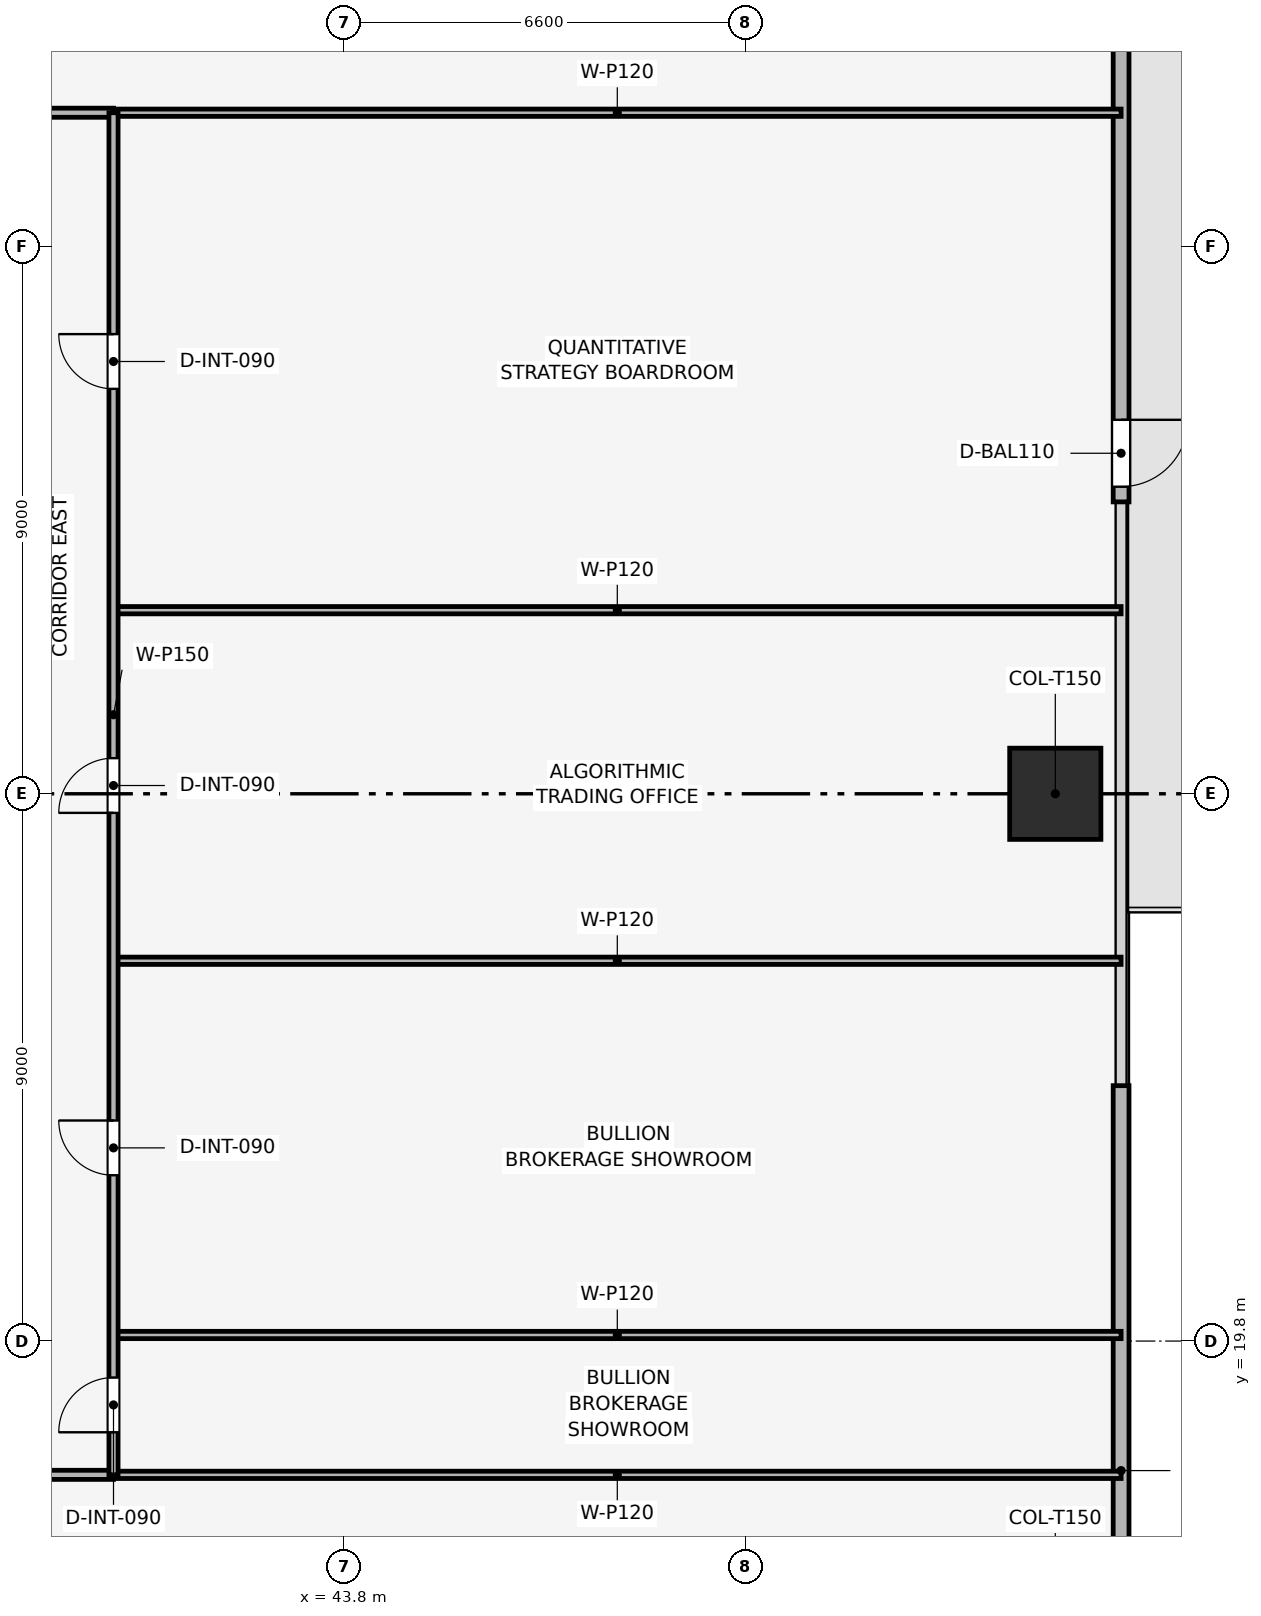
"""IFC4 building model, lengths in metres.
Left out: names, types, materials, properties, quantities, classifications, styles, units other than length and angle.
Written with IfcOpenShell. Run it as: python <this file> out.ifc"""

import sys

from ifc_helpers import new_model, si_unit, direction, frame, frame_2d, origin, origin_2d, place, context, subcontext, project, spatial, rectangle, extrude, element, fill, save


model = new_model("IFC4")
c1 = context("Model", 3, precision=1e-05, world=origin(), true_north=direction((0.0, 1.0)))
c2 = subcontext(c1, "Body", "Model", "MODEL_VIEW")
j1 = project(units=[si_unit("LENGTHUNIT", "METRE"), si_unit("PLANEANGLEUNIT", "RADIAN")], contexts=[c1])
p1 = place(None, origin())
s1 = spatial("IfcSite", under=j1, at=p1, CompositionType="ELEMENT")
p2 = place(p1, origin())
s2 = spatial("IfcBuilding", under=s1, at=p2, CompositionType="ELEMENT")
p3 = place(p2, frame((0.0, 0.0, 104.1)))
s3 = spatial("IfcBuildingStorey", under=s2, at=p3, CompositionType="ELEMENT", Elevation=104.1)
p4 = place(p3, frame((55.488, 28.8, 0.053), z_axis=(-0.224854519766, 0.0, 0.974392346512), x_axis=(0.0, -1.0, 0.0)))
e1 = element("IfcColumn", 1, at=p4, inside=s3, PredefinedType="COLUMN", context=c2, shape_type="SweptSolid", body=[
    extrude(rectangle(XDim=1.5, YDim=1.5, at=origin_2d()), origin(), (0.0, 0.0, 1.0), 3.575),
])
p5 = place(p3, frame((56.57, 48.9, 0.0), z_axis=(0.0, 0.0, 1.0), x_axis=(0.0, -1.0, 0.0)))
e2 = element("IfcWall", 2, at=p5, inside=s3, PredefinedType="SOLIDWALL", context=c2, shape_type="SweptSolid", body=[
    extrude(rectangle(XDim=15.3, YDim=0.26, at=frame_2d((7.65, 0.0))), origin(), (0.0, 0.0, 1.0), 3.54),
])
p6 = place(p5, frame((13.95, 0.0, 0.0)))
e3 = element("IfcOpeningElement", 3, at=p6, cuts=e2, PredefinedType="OPENING", context=c2, shape_type="SweptSolid", body=[
    extrude(rectangle(XDim=1.1, YDim=2.2, at=frame_2d((0.55, 1.1))), frame((0.0, 0.14, 0.0), z_axis=(0.0, -1.0, 0.0), x_axis=(1.0, 0.0, 0.0)), (0.0, 0.0, 1.0), 0.28),
])
p7 = place(p3, frame((56.57, 24.0, 0.0), z_axis=(0.0, 0.0, 1.0), x_axis=(0.0, -1.0, 0.0)))
e4 = element("IfcWall", 4, at=p7, inside=s3, PredefinedType="SOLIDWALL", context=c2, shape_type="SweptSolid", body=[
    extrude(rectangle(XDim=15.3, YDim=0.26, at=frame_2d((7.65, 0.0))), origin(), (0.0, 0.0, 1.0), 3.54),
])
p8 = place(p7, frame((12.65, 0.0, 0.72)))
e5 = element("IfcOpeningElement", 5, at=p8, cuts=e4, PredefinedType="OPENING", context=c2, shape_type="SweptSolid", body=[
    extrude(rectangle(XDim=2.4, YDim=2.1, at=frame_2d((1.2, 1.05))), frame((0.0, 0.14, 0.0), z_axis=(0.0, -1.0, 0.0), x_axis=(1.0, 0.0, 0.0)), (0.0, 0.0, 1.0), 0.28),
])
for number, where, z_axis, x_axis in (
    (6, (40.0, 17.6, 0.0), (0.0, 0.0, 1.0), (1.0, 0.0, 0.0)),
    (7, (40.0, 40.0, 0.0), (0.0, 0.0, 1.0), (1.0, 0.0, 0.0)),
    (8, (40.0, 19.9, 0.0), (0.0, 0.0, 1.0), (1.0, 0.0, 0.0)),
    (9, (40.0, 26.054, 0.0), (0.0, 0.0, 1.0), (1.0, 0.0, 0.0)),
    (10, (40.0, 31.819, 0.0), (0.0, 0.0, 1.0), (1.0, 0.0, 0.0)),
):
    element("IfcWall", number, at=place(p3, frame(where, z_axis=z_axis, x_axis=x_axis)), inside=s3, PredefinedType="PARTITIONING", context=c2, shape_type="SweptSolid", body=[
        extrude(rectangle(XDim=16.57, YDim=0.12, at=frame_2d((8.285, 0.0))), origin(), (0.0, 0.0, 1.0), 2.825),
    ])
p9 = place(p3, frame((17.6, 17.6, 0.0), z_axis=(0.0, 0.0, 1.0), x_axis=(1.0, 0.0, 0.0)))
e11 = element("IfcWall", 11, at=p9, inside=s3, PredefinedType="PARTITIONING", context=c2, shape_type="SweptSolid", body=[
    extrude(rectangle(XDim=22.4, YDim=0.15, at=frame_2d((11.2, 0.0))), origin(), (0.0, 0.0, 1.0), 2.975),
])
p10 = place(p9, frame((0.7, 0.0, 0.0)))
e12 = element("IfcOpeningElement", 12, at=p10, cuts=e11, PredefinedType="OPENING", context=c2, shape_type="SweptSolid", body=[
    extrude(rectangle(XDim=0.9, YDim=2.1, at=frame_2d((0.45, 1.05))), frame((0.0, 0.085, 0.0), z_axis=(0.0, -1.0, 0.0), x_axis=(1.0, 0.0, 0.0)), (0.0, 0.0, 1.0), 0.17),
])
p11 = place(p9, frame((6.352, 0.0, 0.0)))
e13 = element("IfcOpeningElement", 13, at=p11, cuts=e11, PredefinedType="OPENING", context=c2, shape_type="SweptSolid", body=[
    extrude(rectangle(XDim=0.9, YDim=2.1, at=frame_2d((0.45, 1.05))), frame((0.0, 0.085, 0.0), z_axis=(0.0, -1.0, 0.0), x_axis=(1.0, 0.0, 0.0)), (0.0, 0.0, 1.0), 0.17),
])
p12 = place(p9, frame((16.402, 0.0, 0.0)))
e14 = element("IfcOpeningElement", 14, at=p12, cuts=e11, PredefinedType="OPENING", context=c2, shape_type="SweptSolid", body=[
    extrude(rectangle(XDim=0.9, YDim=2.1, at=frame_2d((0.45, 1.05))), frame((0.0, 0.085, 0.0), z_axis=(0.0, -1.0, 0.0), x_axis=(1.0, 0.0, 0.0)), (0.0, 0.0, 1.0), 0.17),
])
p13 = place(p3, frame((17.6, 40.0, 0.0), z_axis=(0.0, 0.0, 1.0), x_axis=(1.0, 0.0, 0.0)))
e15 = element("IfcWall", 15, at=p13, inside=s3, PredefinedType="PARTITIONING", context=c2, shape_type="SweptSolid", body=[
    extrude(rectangle(XDim=22.4, YDim=0.15, at=frame_2d((11.2, 0.0))), origin(), (0.0, 0.0, 1.0), 2.975),
])
p14 = place(p13, frame((4.438, 0.0, 0.0)))
e16 = element("IfcOpeningElement", 16, at=p14, cuts=e15, PredefinedType="OPENING", context=c2, shape_type="SweptSolid", body=[
    extrude(rectangle(XDim=0.9, YDim=2.1, at=frame_2d((0.45, 1.05))), frame((0.0, 0.085, 0.0), z_axis=(0.0, -1.0, 0.0), x_axis=(1.0, 0.0, 0.0)), (0.0, 0.0, 1.0), 0.17),
])
p15 = place(p13, frame((15.638, 0.0, 0.0)))
e17 = element("IfcOpeningElement", 17, at=p15, cuts=e15, PredefinedType="OPENING", context=c2, shape_type="SweptSolid", body=[
    extrude(rectangle(XDim=0.9, YDim=2.1, at=frame_2d((0.45, 1.05))), frame((0.0, 0.085, 0.0), z_axis=(0.0, -1.0, 0.0), x_axis=(1.0, 0.0, 0.0)), (0.0, 0.0, 1.0), 0.17),
])
p16 = place(p3, frame((40.0, 17.6, 0.0), z_axis=(0.0, 0.0, 1.0), x_axis=(0.0, 1.0, 0.0)))
e18 = element("IfcWall", 18, at=p16, inside=s3, PredefinedType="PARTITIONING", context=c2, shape_type="SweptSolid", body=[
    extrude(rectangle(XDim=22.4, YDim=0.15, at=frame_2d((11.2, 0.0))), origin(), (0.0, 0.0, 1.0), 2.975),
])
p17 = place(p16, frame((0.7, 0.0, 0.0)))
e19 = element("IfcOpeningElement", 19, at=p17, cuts=e18, PredefinedType="OPENING", context=c2, shape_type="SweptSolid", body=[
    extrude(rectangle(XDim=0.9, YDim=2.1, at=frame_2d((0.45, 1.05))), frame((0.0, 0.085, 0.0), z_axis=(0.0, -1.0, 0.0), x_axis=(1.0, 0.0, 0.0)), (0.0, 0.0, 1.0), 0.17),
])
p18 = place(p16, frame((4.927, 0.0, 0.0)))
e20 = element("IfcOpeningElement", 20, at=p18, cuts=e18, PredefinedType="OPENING", context=c2, shape_type="SweptSolid", body=[
    extrude(rectangle(XDim=0.9, YDim=2.1, at=frame_2d((0.45, 1.05))), frame((0.0, 0.085, 0.0), z_axis=(0.0, -1.0, 0.0), x_axis=(1.0, 0.0, 0.0)), (0.0, 0.0, 1.0), 0.17),
])
p19 = place(p16, frame((10.886, 0.0, 0.0)))
e21 = element("IfcOpeningElement", 21, at=p19, cuts=e18, PredefinedType="OPENING", context=c2, shape_type="SweptSolid", body=[
    extrude(rectangle(XDim=0.9, YDim=2.1, at=frame_2d((0.45, 1.05))), frame((0.0, 0.085, 0.0), z_axis=(0.0, -1.0, 0.0), x_axis=(1.0, 0.0, 0.0)), (0.0, 0.0, 1.0), 0.17),
])
p20 = place(p16, frame((17.859, 0.0, 0.0)))
e22 = element("IfcOpeningElement", 22, at=p20, cuts=e18, PredefinedType="OPENING", context=c2, shape_type="SweptSolid", body=[
    extrude(rectangle(XDim=0.9, YDim=2.1, at=frame_2d((0.45, 1.05))), frame((0.0, 0.085, 0.0), z_axis=(0.0, -1.0, 0.0), x_axis=(1.0, 0.0, 0.0)), (0.0, 0.0, 1.0), 0.17),
])
p21 = place(p6, origin())
e23 = element("IfcDoor", 23, at=p21, inside=s3, OperationType="SINGLE_SWING_LEFT", PredefinedType="DOOR", context=c2, shape_type="SweptSolid", body=[
    extrude(rectangle(XDim=1.1, YDim=2.2, at=frame_2d((0.55, 1.1))), frame((0.0, 0.025, 0.0), z_axis=(0.0, -1.0, 0.0), x_axis=(1.0, 0.0, 0.0)), (0.0, 0.0, 1.0), 0.05),
])
fill(e3, e23)
p22 = place(p17, origin())
e24 = element("IfcDoor", 24, at=p22, inside=s3, OperationType="SINGLE_SWING_LEFT", PredefinedType="DOOR", context=c2, shape_type="SweptSolid", body=[
    extrude(rectangle(XDim=0.9, YDim=2.1, at=frame_2d((0.45, 1.05))), frame((0.0, 0.025, 0.0), z_axis=(0.0, -1.0, 0.0), x_axis=(1.0, 0.0, 0.0)), (0.0, 0.0, 1.0), 0.05),
])
fill(e19, e24)
p23 = place(p18, origin())
e25 = element("IfcDoor", 25, at=p23, inside=s3, OperationType="SINGLE_SWING_RIGHT", PredefinedType="DOOR", context=c2, shape_type="SweptSolid", body=[
    extrude(rectangle(XDim=0.9, YDim=2.1, at=frame_2d((0.45, 1.05))), frame((0.0, 0.025, 0.0), z_axis=(0.0, -1.0, 0.0), x_axis=(1.0, 0.0, 0.0)), (0.0, 0.0, 1.0), 0.05),
])
fill(e20, e25)
p24 = place(p19, origin())
e26 = element("IfcDoor", 26, at=p24, inside=s3, OperationType="SINGLE_SWING_LEFT", PredefinedType="DOOR", context=c2, shape_type="SweptSolid", body=[
    extrude(rectangle(XDim=0.9, YDim=2.1, at=frame_2d((0.45, 1.05))), frame((0.0, 0.025, 0.0), z_axis=(0.0, -1.0, 0.0), x_axis=(1.0, 0.0, 0.0)), (0.0, 0.0, 1.0), 0.05),
])
fill(e21, e26)
p25 = place(p20, origin())
e27 = element("IfcDoor", 27, at=p25, inside=s3, OperationType="SINGLE_SWING_RIGHT", PredefinedType="DOOR", context=c2, shape_type="SweptSolid", body=[
    extrude(rectangle(XDim=0.9, YDim=2.1, at=frame_2d((0.45, 1.05))), frame((0.0, 0.025, 0.0), z_axis=(0.0, -1.0, 0.0), x_axis=(1.0, 0.0, 0.0)), (0.0, 0.0, 1.0), 0.05),
])
fill(e22, e27)
save(model, sys.argv[1])
